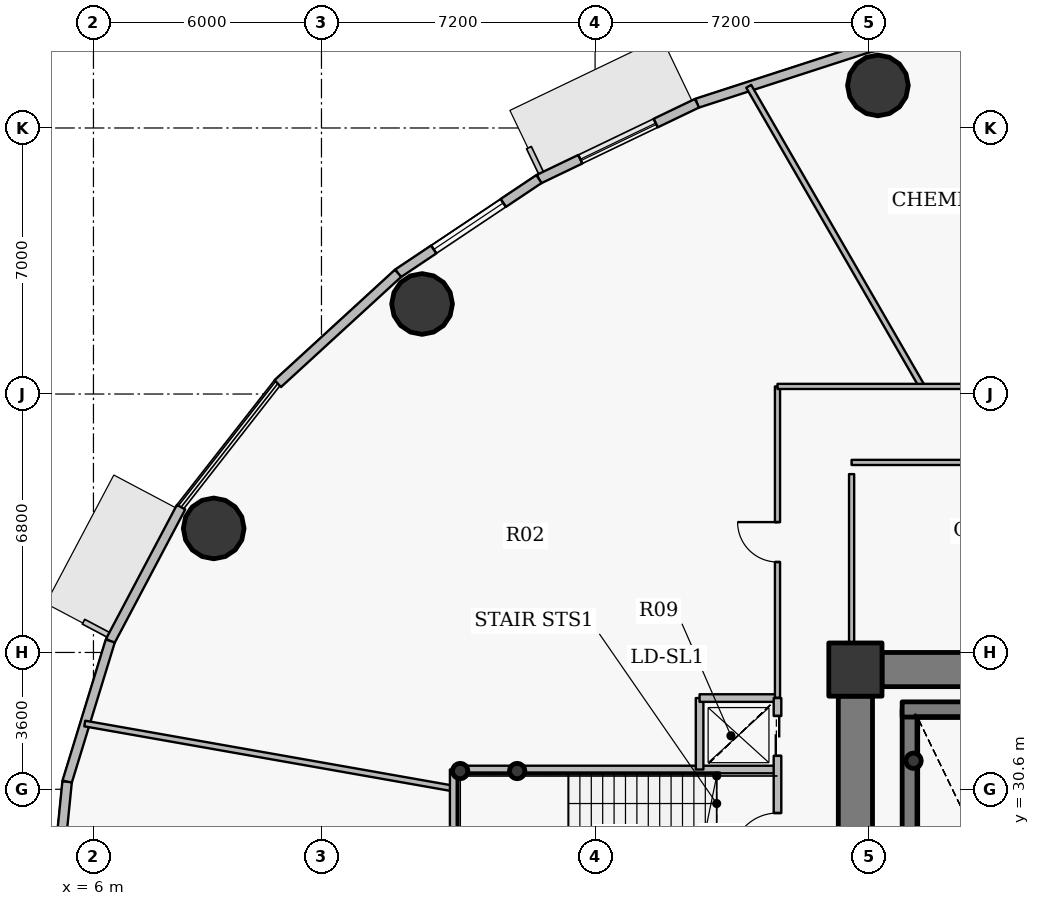
"""IFC4 building model, lengths in metres.
Left out: names, types, materials, properties, quantities, classifications, styles, units other than length and angle.
Written with IfcOpenShell. Run it as: python <this file> out.ifc"""

import sys

from ifc_helpers import new_model, si_unit, direction, frame, frame_2d, origin, origin_2d, place, context, subcontext, project, spatial, rectangle, hollow_circle, extrude, source, transform, mapped, element, fill, save


model = new_model("IFC4")
c1 = context("Model", 3, precision=1e-05, world=origin(), true_north=direction((0.0, 1.0)))
c2 = subcontext(c1, "Body", "Model", "MODEL_VIEW")
j1 = project(units=[si_unit("LENGTHUNIT", "METRE"), si_unit("PLANEANGLEUNIT", "RADIAN")], contexts=[c1])
p1 = place(None, origin())
s1 = spatial("IfcSite", under=j1, at=p1, CompositionType="ELEMENT")
p2 = place(p1, origin())
s2 = spatial("IfcBuilding", under=s1, at=p2, CompositionType="ELEMENT")
p3 = place(p2, frame((0.0, 0.0, 36.6)))
s3 = spatial("IfcBuildingStorey", under=s2, at=p3, CompositionType="ELEMENT", Elevation=36.6)
p4 = place(p3, frame((26.05, 33.75, 0.0), z_axis=(0.0, 0.0, 1.0), x_axis=(1.0, 0.0, 0.0)))
e1 = element("IfcColumn", 1, at=p4, inside=s3, PredefinedType="COLUMN", context=c2, shape_type="SweptSolid", body=[
    extrude(rectangle(XDim=1.4, YDim=1.4, at=origin_2d()), origin(), (0.0, 0.0, 1.0), 4.2),
])
p5 = place(p3, frame((27.48, 24.1, 0.0), z_axis=(0.0, 0.0, 1.0), x_axis=(0.0, 1.0, 0.0)))
e2 = element("IfcWall", 2, at=p5, inside=s3, PredefinedType="SHEAR", context=c2, shape_type="SweptSolid", body=[
    extrude(rectangle(XDim=8.6, YDim=0.4, at=frame_2d((4.3, 0.0))), origin(), (0.0, 0.0, 1.0), 4.2),
])
p6 = place(p3, frame((27.28, 32.7, 0.0), z_axis=(0.0, 0.0, 1.0), x_axis=(1.0, 0.0, 0.0)))
e3 = element("IfcWall", 3, at=p6, inside=s3, PredefinedType="SHEAR", context=c2, shape_type="SweptSolid", body=[
    extrude(rectangle(XDim=4.1, YDim=0.4, at=frame_2d((2.05, 0.0))), origin(), (0.0, 0.0, 1.0), 4.2),
])
for number, where, z_axis, x_axis in (
    (4, (27.58, 31.35, 0.0), (0.0, 0.0, 1.0), (1.0, 0.0, 0.0)),
    (5, (15.65, 31.08, 0.0), (0.0, 0.0, 1.0), (1.0, 0.0, 0.0)),
    (6, (17.15, 31.08, 0.0), (0.0, 0.0, 1.0), (1.0, 0.0, 0.0)),
):
    element("IfcColumn", number, at=place(p3, frame(where, z_axis=z_axis, x_axis=x_axis)), inside=s3, PredefinedType="COLUMN", context=c2, shape_type="SweptSolid", body=[
        extrude(hollow_circle(Radius=0.203, WallThickness=0.016, at=origin_2d()), origin(), (0.0, 0.0, 1.0), 4.2),
    ])
p7 = place(p3, frame((26.75, 33.75, 0.0), z_axis=(0.0, 0.0, 1.0), x_axis=(1.0, 0.0, 0.0)))
e7 = element("IfcWall", 7, at=p7, inside=s3, PredefinedType="SHEAR", context=c2, shape_type="SweptSolid", body=[
    extrude(rectangle(XDim=18.5, YDim=0.9, at=frame_2d((9.25, 0.0))), origin(), (0.0, 0.0, 1.0), 3.4),
])
p8 = place(p3, frame((26.05, 20.95, 0.0), z_axis=(0.0, 0.0, 1.0), x_axis=(0.0, 1.0, 0.0)))
e8 = element("IfcWall", 8, at=p8, inside=s3, PredefinedType="SHEAR", context=c2, shape_type="SweptSolid", body=[
    extrude(rectangle(XDim=12.1, YDim=0.9, at=frame_2d((6.05, 0.0))), origin(), (0.0, 0.0, 1.0), 3.4),
])
p9 = place(p8, frame((5.64, 0.0, 0.0)))
e9 = element("IfcOpeningElement", 9, at=p9, cuts=e8, PredefinedType="OPENING", context=c2, shape_type="SweptSolid", body=[
    extrude(rectangle(XDim=0.82, YDim=2.1, at=origin_2d()), frame((0.41, 0.46, 1.05), z_axis=(0.0, -1.0, 0.0), x_axis=(1.0, 0.0, 0.0)), (0.0, 0.0, 1.0), 0.92),
])
for number, where, z_axis, x_axis in (
    (10, (26.642, 49.12, 0.0), (0.0, 0.0, 1.0), (1.0, 0.0, 0.0)),
    (11, (14.647, 43.369, 0.0), (0.0, 0.0, 1.0), (1.0, 0.0, 0.0)),
    (12, (9.165, 37.464, 0.0), (0.0, 0.0, 1.0), (1.0, 0.0, 0.0)),
):
    element("IfcColumn", number, at=place(p3, frame(where, z_axis=z_axis, x_axis=x_axis)), inside=s3, PredefinedType="COLUMN", context=c2, shape_type="SweptSolid", body=[
        extrude(hollow_circle(Radius=0.8, WallThickness=0.045, at=origin_2d()), origin(), (0.0, 0.0, 1.0), 4.2),
    ])
p10 = place(p3, frame((21.882, 48.651, 0.0), z_axis=(0.0, 0.0, 1.0), x_axis=(0.951207699013, 0.308551313946, 0.0)))
e13 = element("IfcWall", 13, at=p10, inside=s3, PredefinedType="SOLIDWALL", context=c2, shape_type="SweptSolid", body=[
    extrude(rectangle(XDim=4.739, YDim=0.25, at=frame_2d((2.369, 0.0))), origin(), (0.0, 0.0, 1.0), 3.95),
])
p11 = place(p3, frame((17.723, 46.656, 0.0), z_axis=(0.0, 0.0, 1.0), x_axis=(0.901601503137, 0.432567601123, 0.0)))
e14 = element("IfcWall", 14, at=p11, inside=s3, PredefinedType="SOLIDWALL", context=c2, shape_type="SweptSolid", body=[
    extrude(rectangle(XDim=4.613, YDim=0.25, at=frame_2d((2.306, 0.0))), origin(), (0.0, 0.0, 1.0), 3.95),
])
p12 = place(p11, frame((1.207, 0.0, 0.9)))
e15 = element("IfcOpeningElement", 15, at=p12, cuts=e14, PredefinedType="OPENING", context=c2, shape_type="SweptSolid", body=[
    extrude(rectangle(XDim=2.2, YDim=2.0, at=origin_2d()), frame((1.1, 0.135, 1.0), z_axis=(0.0, -1.0, 0.0), x_axis=(1.0, 0.0, 0.0)), (0.0, 0.0, 1.0), 0.27),
])
p13 = place(p3, frame((14.015, 44.176, 0.0), z_axis=(0.0, 0.0, 1.0), x_axis=(0.831240982525, 0.555912249343, 0.0)))
e16 = element("IfcWall", 16, at=p13, inside=s3, PredefinedType="SOLIDWALL", context=c2, shape_type="SweptSolid", body=[
    extrude(rectangle(XDim=4.46, YDim=0.25, at=frame_2d((2.23, 0.0))), origin(), (0.0, 0.0, 1.0), 3.95),
])
p14 = place(p13, frame((1.13, 0.0, 0.9)))
e17 = element("IfcOpeningElement", 17, at=p14, cuts=e16, PredefinedType="OPENING", context=c2, shape_type="SweptSolid", body=[
    extrude(rectangle(XDim=2.2, YDim=2.0, at=origin_2d()), frame((1.1, 0.135, 1.0), z_axis=(0.0, -1.0, 0.0), x_axis=(1.0, 0.0, 0.0)), (0.0, 0.0, 1.0), 0.27),
])
p15 = place(p3, frame((10.85, 41.275, 0.0), z_axis=(0.0, 0.0, 1.0), x_axis=(0.737116376281, 0.67576582321, 0.0)))
e18 = element("IfcWall", 18, at=p15, inside=s3, PredefinedType="SOLIDWALL", context=c2, shape_type="SweptSolid", body=[
    extrude(rectangle(XDim=4.294, YDim=0.25, at=frame_2d((2.147, 0.0))), origin(), (0.0, 0.0, 1.0), 3.95),
])
p16 = place(p3, frame((6.442, 34.501, 0.0), z_axis=(0.0, 0.0, 1.0), x_axis=(0.467662443071, 0.883907144072, 0.0)))
e19 = element("IfcWall", 19, at=p16, inside=s3, PredefinedType="SOLIDWALL", context=c2, shape_type="SweptSolid", body=[
    extrude(rectangle(XDim=3.984, YDim=0.25, at=frame_2d((1.992, 0.0))), origin(), (0.0, 0.0, 1.0), 3.95),
])
p17 = place(p3, frame((5.307, 30.797, 0.0), z_axis=(0.0, 0.0, 1.0), x_axis=(0.293111631758, 0.956078224482, 0.0)))
e20 = element("IfcWall", 20, at=p17, inside=s3, PredefinedType="SOLIDWALL", context=c2, shape_type="SweptSolid", body=[
    extrude(rectangle(XDim=3.875, YDim=0.25, at=frame_2d((1.938, 0.0))), origin(), (0.0, 0.0, 1.0), 3.95),
])
p18 = place(p3, frame((4.925, 27.0, 0.0), z_axis=(0.0, 0.0, 1.0), x_axis=(0.099997795174, 0.994987658698, 0.0)))
e21 = element("IfcWall", 21, at=p18, inside=s3, PredefinedType="SOLIDWALL", context=c2, shape_type="SweptSolid", body=[
    extrude(rectangle(XDim=3.816, YDim=0.25, at=frame_2d((1.908, 0.0))), origin(), (0.0, 0.0, 1.0), 3.95),
])
p19 = place(p3, frame((5.771, 32.33, 0.0), z_axis=(0.0, 0.0, 1.0), x_axis=(0.984806985247, -0.173652531825, 0.0)))
e22 = element("IfcWall", 22, at=p19, inside=s3, PredefinedType="PARTITIONING", context=c2, shape_type="SweptSolid", body=[
    extrude(rectangle(XDim=9.858, YDim=0.15, at=frame_2d((4.929, 0.0))), origin(), (0.0, 0.0, 1.0), 3.335),
])
p20 = place(p3, frame((15.48, 27.58, 0.0), z_axis=(0.0, 0.0, 1.0), x_axis=(0.0, 1.0, 0.0)))
e23 = element("IfcWall", 23, at=p20, inside=s3, PredefinedType="PARTITIONING", context=c2, shape_type="SweptSolid", body=[
    extrude(rectangle(XDim=3.54, YDim=0.2, at=frame_2d((1.77, 0.0))), origin(), (0.0, 0.0, 1.0), 3.95),
])
p21 = place(p3, frame((15.48, 31.12, 0.0), z_axis=(0.0, 0.0, 1.0), x_axis=(1.0, 0.0, 0.0)))
e24 = element("IfcWall", 24, at=p21, inside=s3, PredefinedType="PARTITIONING", context=c2, shape_type="SweptSolid", body=[
    extrude(rectangle(XDim=8.52, YDim=0.2, at=frame_2d((4.26, 0.0))), origin(), (0.0, 0.0, 1.0), 3.95),
])
p22 = place(p3, frame((21.95, 31.12, 0.0), z_axis=(0.0, 0.0, 1.0), x_axis=(0.0, 1.0, 0.0)))
e25 = element("IfcWall", 25, at=p22, inside=s3, PredefinedType="PARTITIONING", context=c2, shape_type="SweptSolid", body=[
    extrude(rectangle(XDim=1.88, YDim=0.2, at=frame_2d((0.94, 0.0))), origin(), (0.0, 0.0, 1.0), 3.285),
])
p23 = place(p3, frame((21.95, 33.0, 0.0), z_axis=(0.0, 0.0, 1.0), x_axis=(1.0, 0.0, 0.0)))
e26 = element("IfcWall", 26, at=p23, inside=s3, PredefinedType="PARTITIONING", context=c2, shape_type="SweptSolid", body=[
    extrude(rectangle(XDim=2.05, YDim=0.2, at=frame_2d((1.025, 0.0))), origin(), (0.0, 0.0, 1.0), 3.95),
])
p24 = place(p3, frame((23.242, 49.098, 0.0), z_axis=(0.0, 0.0, 1.0), x_axis=(0.499985867395, -0.866033563094, 0.0)))
e27 = element("IfcWall", 27, at=p24, inside=s3, PredefinedType="PARTITIONING", context=c2, shape_type="SweptSolid", body=[
    extrude(rectangle(XDim=9.119, YDim=0.15, at=frame_2d((4.56, 0.0))), origin(), (0.0, 0.0, 1.0), 3.335),
])
p25 = place(p3, frame((24.0, 27.59, 0.0), z_axis=(0.0, 0.0, 1.0), x_axis=(0.0, 1.0, 0.0)))
e28 = element("IfcWall", 28, at=p25, inside=s3, PredefinedType="PARTITIONING", context=c2, shape_type="SweptSolid", body=[
    extrude(rectangle(XDim=5.41, YDim=0.2, at=frame_2d((2.705, 0.0))), origin(), (0.0, 0.0, 1.0), 3.285),
])
p26 = place(p25, frame((1.185, 0.0, 0.0)))
e29 = element("IfcOpeningElement", 29, at=p26, cuts=e28, PredefinedType="OPENING", context=c2, shape_type="SweptSolid", body=[
    extrude(rectangle(XDim=1.2, YDim=2.15, at=origin_2d()), frame((0.6, 0.11, 1.075), z_axis=(0.0, -1.0, 0.0), x_axis=(1.0, 0.0, 0.0)), (0.0, 0.0, 1.0), 0.22),
])
p27 = place(p25, frame((3.89, 0.0, 0.0)))
e30 = element("IfcOpeningElement", 30, at=p27, cuts=e28, PredefinedType="OPENING", context=c2, shape_type="SweptSolid", body=[
    extrude(rectangle(XDim=1.05, YDim=2.15, at=origin_2d()), frame((0.525, 0.11, 1.075), z_axis=(0.0, -1.0, 0.0), x_axis=(1.0, 0.0, 0.0)), (0.0, 0.0, 1.0), 0.22),
])
p28 = place(p3, frame((24.0, 33.01, 0.0), z_axis=(0.0, 0.0, 1.0), x_axis=(0.0, 1.0, 0.0)))
e31 = element("IfcWall", 31, at=p28, inside=s3, PredefinedType="PARTITIONING", context=c2, shape_type="SweptSolid", body=[
    extrude(rectangle(XDim=8.19, YDim=0.135, at=frame_2d((4.095, 0.0))), origin(), (0.0, 0.0, 1.0), 3.285),
])
p29 = place(p28, frame((3.57, 0.0, 0.0)))
e32 = element("IfcOpeningElement", 32, at=p29, cuts=e31, PredefinedType="OPENING", context=c2, shape_type="SweptSolid", body=[
    extrude(rectangle(XDim=1.05, YDim=2.15, at=origin_2d()), frame((0.525, 0.078, 1.075), z_axis=(0.0, -1.0, 0.0), x_axis=(1.0, 0.0, 0.0)), (0.0, 0.0, 1.0), 0.155),
])
p30 = place(p3, frame((24.0, 41.2, 0.0), z_axis=(0.0, 0.0, 1.0), x_axis=(1.0, 0.0, 0.0)))
e33 = element("IfcWall", 33, at=p30, inside=s3, PredefinedType="PARTITIONING", context=c2, shape_type="SweptSolid", body=[
    extrude(rectangle(XDim=24.0, YDim=0.135, at=frame_2d((12.0, 0.0))), origin(), (0.0, 0.0, 1.0), 3.285),
])
p31 = place(p30, frame((9.96, 0.0, 0.0)))
e34 = element("IfcOpeningElement", 34, at=p31, cuts=e33, PredefinedType="OPENING", context=c2, shape_type="SweptSolid", body=[
    extrude(rectangle(XDim=1.05, YDim=2.15, at=origin_2d()), frame((0.525, 0.078, 1.075), z_axis=(0.0, -1.0, 0.0), x_axis=(1.0, 0.0, 0.0)), (0.0, 0.0, 1.0), 0.155),
])
p32 = place(p3, frame((38.893, 39.2, 0.0), z_axis=(0.0, 0.0, 1.0), x_axis=(-1.0, 0.0, 0.0)))
e35 = element("IfcWall", 35, at=p32, inside=s3, PredefinedType="PARTITIONING", context=c2, shape_type="SweptSolid", body=[
    extrude(rectangle(XDim=12.943, YDim=0.135, at=frame_2d((6.471, 0.0))), origin(), (0.0, 0.0, 1.0), 3.285),
])
p33 = place(p3, frame((25.95, 38.893, 0.0), z_axis=(0.0, 0.0, 1.0), x_axis=(0.0, -1.0, 0.0)))
e36 = element("IfcWall", 36, at=p33, inside=s3, PredefinedType="PARTITIONING", context=c2, shape_type="SweptSolid", body=[
    extrude(rectangle(XDim=4.693, YDim=0.135, at=frame_2d((2.346, 0.0))), origin(), (0.0, 0.0, 1.0), 3.285),
])
p34 = place(p3, frame((25.6, 34.2, 0.0), z_axis=(0.0, 0.0, 1.0), x_axis=(0.0, -1.0, 0.0)))
e37 = element("IfcWall", 37, at=p34, inside=s3, PredefinedType="PARTITIONING", context=c2, shape_type="SweptSolid", body=[
    extrude(rectangle(XDim=1.14, YDim=0.135, at=frame_2d((0.57, 0.0))), origin(), (0.0, 0.0, 1.0), 3.95),
])
m1 = source(origin(), c2, "Body", "SweptSolid", [
    extrude(rectangle(XDim=2.2, YDim=2.0, at=origin_2d()), frame((1.1, 0.03, 1.0), z_axis=(0.0, -1.0, 0.0), x_axis=(1.0, 0.0, 0.0)), (0.0, 0.0, 1.0), 0.06),
])
p35 = place(p12, origin())
e38 = element("IfcWindow", 38, at=p35, inside=s3, PartitioningType="TRIPLE_PANEL_VERTICAL", PredefinedType="WINDOW", context=c2, shape_type="MappedRepresentation", body=[
    mapped(m1, transform((0.0, 0.0, 0.0), x_axis=(1.0, 0.0, 0.0), y_axis=(0.0, 1.0, 0.0), z_axis=(0.0, 0.0, 1.0), scale=1.0)),
])
fill(e15, e38)
p36 = place(p14, origin())
e39 = element("IfcWindow", 39, at=p36, inside=s3, PartitioningType="TRIPLE_PANEL_VERTICAL", PredefinedType="WINDOW", context=c2, shape_type="MappedRepresentation", body=[
    mapped(m1, transform((0.0, 0.0, 0.0), x_axis=(1.0, 0.0, 0.0), y_axis=(0.0, 1.0, 0.0), z_axis=(0.0, 0.0, 1.0), scale=1.0)),
])
fill(e17, e39)
m2 = source(origin(), c2, "Body", "SweptSolid", [
    extrude(rectangle(XDim=1.2, YDim=2.15, at=origin_2d()), frame((0.6, 0.025, 1.075), z_axis=(0.0, -1.0, 0.0), x_axis=(1.0, 0.0, 0.0)), (0.0, 0.0, 1.0), 0.05),
])
p37 = place(p26, origin())
e40 = element("IfcDoor", 40, at=p37, inside=s3, OperationType="SINGLE_SWING_LEFT", PredefinedType="DOOR", context=c2, shape_type="MappedRepresentation", body=[
    mapped(m2, transform((0.0, 0.0, 0.0), x_axis=(1.0, 0.0, 0.0), y_axis=(0.0, 1.0, 0.0), z_axis=(0.0, 0.0, 1.0), scale=1.0)),
])
fill(e29, e40)
m3 = source(origin(), c2, "Body", "SweptSolid", [
    extrude(rectangle(XDim=1.05, YDim=2.15, at=origin_2d()), frame((0.525, 0.025, 1.075), z_axis=(0.0, -1.0, 0.0), x_axis=(1.0, 0.0, 0.0)), (0.0, 0.0, 1.0), 0.05),
])
p38 = place(p27, origin())
e41 = element("IfcDoor", 41, at=p38, inside=s3, OperationType="DOUBLE_DOOR_SLIDING", PredefinedType="USERDEFINED", context=c2, shape_type="MappedRepresentation", body=[
    mapped(m3, transform((0.0, 0.0, 0.0), x_axis=(1.0, 0.0, 0.0), y_axis=(0.0, 1.0, 0.0), z_axis=(0.0, 0.0, 1.0), scale=1.0)),
])
fill(e30, e41)
m4 = source(origin(), c2, "Body", "SweptSolid", [
    extrude(rectangle(XDim=1.05, YDim=2.15, at=origin_2d()), frame((0.525, 0.025, 1.075), z_axis=(0.0, -1.0, 0.0), x_axis=(1.0, 0.0, 0.0)), (0.0, 0.0, 1.0), 0.05),
])
p39 = place(p29, origin())
e42 = element("IfcDoor", 42, at=p39, inside=s3, OperationType="SINGLE_SWING_RIGHT", PredefinedType="DOOR", context=c2, shape_type="MappedRepresentation", body=[
    mapped(m4, transform((0.0, 0.0, 0.0), x_axis=(1.0, 0.0, 0.0), y_axis=(0.0, 1.0, 0.0), z_axis=(0.0, 0.0, 1.0), scale=1.0)),
])
fill(e32, e42)
save(model, sys.argv[1])
